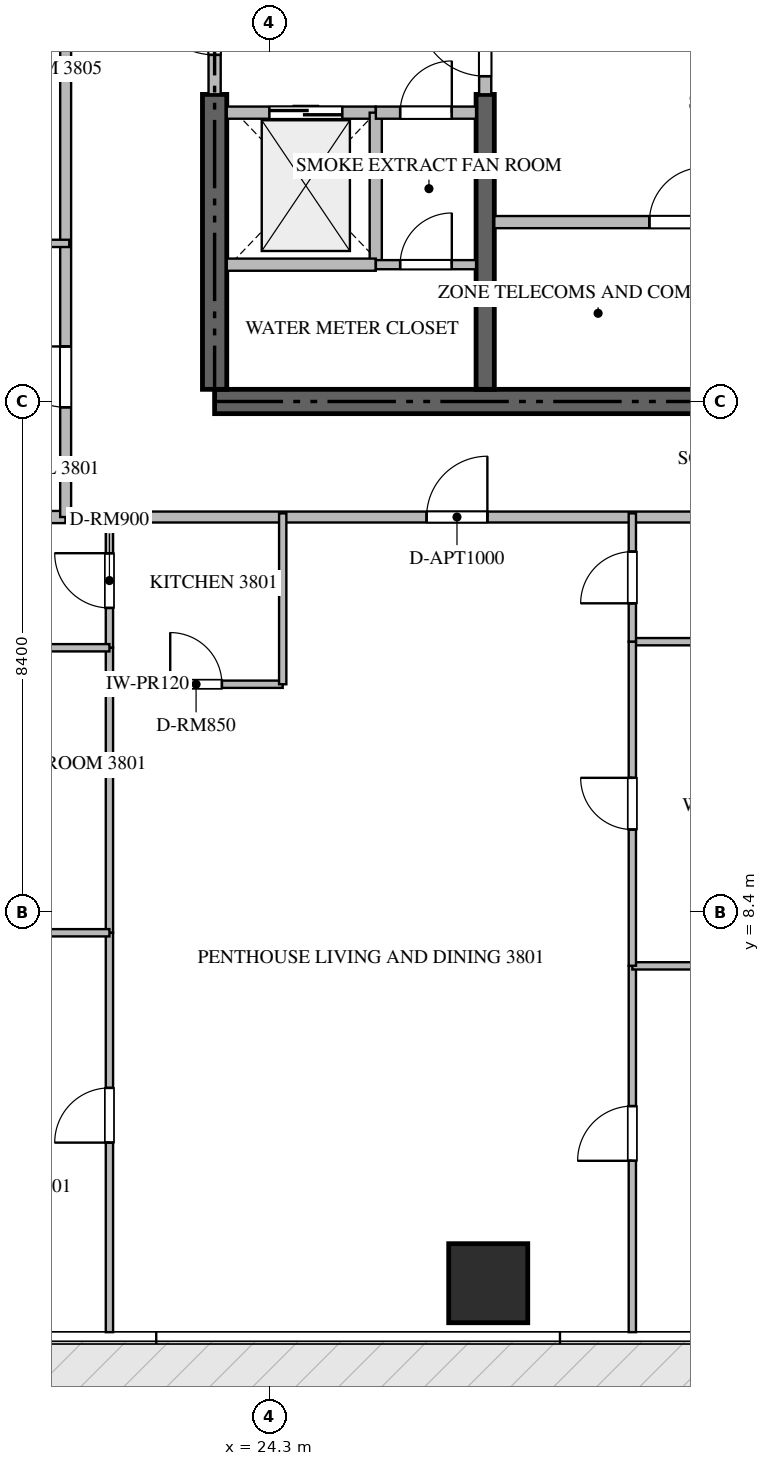
"""IFC4 building model, lengths in metres.
Left out: names, types, materials, properties, quantities, classifications, styles, units other than length and angle.
Written with IfcOpenShell. Run it as: python <this file> out.ifc"""

import sys

from ifc_helpers import new_model, si_unit, direction, frame, frame_2d, origin, origin_2d, place, context, subcontext, project, spatial, rectangle, extrude, source, transform, mapped, element, fill, save


model = new_model("IFC4")
c1 = context("Model", 3, precision=1e-05, world=origin(), true_north=direction((0.0, 1.0)))
c2 = subcontext(c1, "Body", "Model", "MODEL_VIEW")
j1 = project(units=[si_unit("LENGTHUNIT", "METRE"), si_unit("PLANEANGLEUNIT", "RADIAN")], contexts=[c1])
p1 = place(None, origin())
s1 = spatial("IfcSite", under=j1, at=p1, CompositionType="ELEMENT")
p2 = place(p1, origin())
s2 = spatial("IfcBuilding", under=s1, at=p2, CompositionType="ELEMENT")
p3 = place(p2, frame((0.0, 0.0, 153.9)))
s3 = spatial("IfcBuildingStorey", under=s2, at=p3, CompositionType="ELEMENT", Elevation=153.9)
p4 = place(p3, frame((23.4, 16.8, -0.26), z_axis=(0.0, 0.0, 1.0), x_axis=(1.0, 0.0, 0.0)))
e1 = element("IfcWall", 1, at=p4, inside=s3, PredefinedType="SHEAR", context=c2, shape_type="SweptSolid", body=[
    extrude(rectangle(XDim=18.0, YDim=0.4, at=frame_2d((9.0, 0.0))), origin(), (0.0, 0.0, 1.0), 3.748),
])
p5 = place(p3, frame((23.4, 17.0, -0.26), z_axis=(0.0, 0.0, 1.0), x_axis=(0.0, 1.0, 0.0)))
e2 = element("IfcWall", 2, at=p5, inside=s3, PredefinedType="SHEAR", context=c2, shape_type="SweptSolid", body=[
    extrude(rectangle(XDim=4.85, YDim=0.4, at=frame_2d((2.425, 0.0))), origin(), (0.0, 0.0, 1.0), 3.748),
])
p6 = place(p3, frame((27.85, 17.0, -0.26), z_axis=(0.0, 0.0, 1.0), x_axis=(0.0, 1.0, 0.0)))
e3 = element("IfcWall", 3, at=p6, inside=s3, PredefinedType="SHEAR", context=c2, shape_type="SweptSolid", body=[
    extrude(rectangle(XDim=4.85, YDim=0.3, at=frame_2d((2.425, 0.0))), origin(), (0.0, 0.0, 1.0), 3.748),
])
m1 = source(origin(), c2, "Body", "SweptSolid", [
    extrude(rectangle(XDim=1.3, YDim=1.3, at=origin_2d()), origin(), (0.0, 0.0, 1.0), 3.75),
])
p7 = place(p3, frame((27.9, 2.3, -0.26), z_axis=(0.0, 0.0, 1.0), x_axis=(1.0, 0.0, 0.0)))
e4 = element("IfcColumn", 4, at=p7, inside=s3, PredefinedType="COLUMN", context=c2, shape_type="MappedRepresentation", body=[
    mapped(m1, transform((0.0, 0.0, 0.0), scale=1.0)),
])
p8 = place(p3, frame((23.6, 21.55, 0.0), z_axis=(0.0, 0.0, 1.0), x_axis=(1.0, 0.0, 0.0)))
e5 = element("IfcWall", 5, at=p8, inside=s3, PredefinedType="STANDARD", context=c2, shape_type="SweptSolid", body=[
    extrude(rectangle(XDim=2.45, YDim=0.2, at=frame_2d((1.225, 0.0))), origin(), (0.0, 0.0, 1.0), 3.49),
])
p9 = place(p8, frame((0.7, 0.0, 0.0)))
e6 = element("IfcOpeningElement", 6, at=p9, cuts=e5, PredefinedType="OPENING", context=c2, shape_type="SweptSolid", body=[
    extrude(rectangle(XDim=1.2, YDim=2.2, at=frame_2d((0.6, 1.1))), frame((0.0, 0.11, 0.0), z_axis=(0.0, -1.0, 0.0), x_axis=(1.0, 0.0, 0.0)), (0.0, 0.0, 1.0), 0.22),
])
p10 = place(p3, frame((26.05, 19.05, 0.0), z_axis=(0.0, 0.0, 1.0), x_axis=(0.0, 1.0, 0.0)))
e7 = element("IfcWall", 7, at=p10, inside=s3, PredefinedType="STANDARD", context=c2, shape_type="SweptSolid", body=[
    extrude(rectangle(XDim=2.5, YDim=0.2, at=frame_2d((1.25, 0.0))), origin(), (0.0, 0.0, 1.0), 3.49),
])
p11 = place(p3, frame((23.6, 19.05, 0.0), z_axis=(0.0, 0.0, 1.0), x_axis=(1.0, 0.0, 0.0)))
e8 = element("IfcWall", 8, at=p11, inside=s3, PredefinedType="STANDARD", context=c2, shape_type="SweptSolid", body=[
    extrude(rectangle(XDim=2.45, YDim=0.2, at=frame_2d((1.225, 0.0))), origin(), (0.0, 0.0, 1.0), 3.49),
])
p12 = place(p3, frame((26.052, 21.55, 0.0), z_axis=(0.0, 0.0, 1.0), x_axis=(1.0, 0.0, 0.0)))
e9 = element("IfcWall", 9, at=p12, inside=s3, PredefinedType="STANDARD", context=c2, shape_type="SweptSolid", body=[
    extrude(rectangle(XDim=1.648, YDim=0.2, at=frame_2d((0.824, 0.0))), origin(), (0.0, 0.0, 1.0), 3.49),
])
p13 = place(p12, frame((0.399, 0.0, 0.0)))
e10 = element("IfcOpeningElement", 10, at=p13, cuts=e9, PredefinedType="OPENING", context=c2, shape_type="SweptSolid", body=[
    extrude(rectangle(XDim=0.85, YDim=2.1, at=frame_2d((0.425, 1.05))), frame((0.0, 0.11, 0.0), z_axis=(0.0, -1.0, 0.0), x_axis=(1.0, 0.0, 0.0)), (0.0, 0.0, 1.0), 0.22),
])
p14 = place(p3, frame((23.4, 21.852, 0.0), z_axis=(0.0, 0.0, 1.0), x_axis=(0.0, 1.0, 0.0)))
e11 = element("IfcWall", 11, at=p14, inside=s3, PredefinedType="STANDARD", context=c2, shape_type="SweptSolid", body=[
    extrude(rectangle(XDim=2.396, YDim=0.2, at=frame_2d((1.198, 0.0))), origin(), (0.0, 0.0, 1.0), 3.49),
])
p15 = place(p14, frame((0.648, 0.0, 0.0)))
e12 = element("IfcOpeningElement", 12, at=p15, cuts=e11, PredefinedType="OPENING", context=c2, shape_type="SweptSolid", body=[
    extrude(rectangle(XDim=1.1, YDim=2.15, at=frame_2d((0.55, 1.075))), frame((0.0, 0.11, 0.0), z_axis=(0.0, -1.0, 0.0), x_axis=(1.0, 0.0, 0.0)), (0.0, 0.0, 1.0), 0.22),
])
p16 = place(p3, frame((27.85, 21.852, 0.0), z_axis=(0.0, 0.0, 1.0), x_axis=(0.0, 1.0, 0.0)))
e13 = element("IfcWall", 13, at=p16, inside=s3, PredefinedType="STANDARD", context=c2, shape_type="SweptSolid", body=[
    extrude(rectangle(XDim=1.696, YDim=0.2, at=frame_2d((0.848, 0.0))), origin(), (0.0, 0.0, 1.0), 3.49),
])
p17 = place(p16, frame((0.298, 0.0, 0.0)))
e14 = element("IfcOpeningElement", 14, at=p17, cuts=e13, PredefinedType="OPENING", context=c2, shape_type="SweptSolid", body=[
    extrude(rectangle(XDim=1.1, YDim=2.15, at=frame_2d((0.55, 1.075))), frame((0.0, 0.11, 0.0), z_axis=(0.0, -1.0, 0.0), x_axis=(1.0, 0.0, 0.0)), (0.0, 0.0, 1.0), 0.22),
])
p18 = place(p3, frame((26.052, 19.05, 0.0), z_axis=(0.0, 0.0, 1.0), x_axis=(1.0, 0.0, 0.0)))
e15 = element("IfcWall", 15, at=p18, inside=s3, PredefinedType="PARTITIONING", context=c2, shape_type="SweptSolid", body=[
    extrude(rectangle(XDim=1.648, YDim=0.15, at=frame_2d((0.824, 0.0))), origin(), (0.0, 0.0, 1.0), 3.49),
])
p19 = place(p18, frame((0.399, 0.0, 0.0)))
e16 = element("IfcOpeningElement", 16, at=p19, cuts=e15, PredefinedType="OPENING", context=c2, shape_type="SweptSolid", body=[
    extrude(rectangle(XDim=0.85, YDim=2.1, at=frame_2d((0.425, 1.05))), frame((0.0, 0.085, 0.0), z_axis=(0.0, -1.0, 0.0), x_axis=(1.0, 0.0, 0.0)), (0.0, 0.0, 1.0), 0.17),
])
p20 = place(p3, frame((28.0, 19.75, 0.0), z_axis=(0.0, 0.0, 1.0), x_axis=(1.0, 0.0, 0.0)))
e17 = element("IfcWall", 17, at=p20, inside=s3, PredefinedType="STANDARD", context=c2, shape_type="SweptSolid", body=[
    extrude(rectangle(XDim=6.0, YDim=0.2, at=frame_2d((3.0, 0.0))), origin(), (0.0, 0.0, 1.0), 3.49),
])
p21 = place(p20, frame((2.55, 0.0, 0.0)))
e18 = element("IfcOpeningElement", 18, at=p21, cuts=e17, PredefinedType="OPENING", context=c2, shape_type="SweptSolid", body=[
    extrude(rectangle(XDim=0.9, YDim=2.1, at=frame_2d((0.45, 1.05))), frame((0.0, 0.11, 0.0), z_axis=(0.0, -1.0, 0.0), x_axis=(1.0, 0.0, 0.0)), (0.0, 0.0, 1.0), 0.22),
])
p22 = place(p3, frame((7.882, 14.9, 0.0), z_axis=(0.0, 0.0, 1.0), x_axis=(1.0, 0.0, 0.0)))
e19 = element("IfcWall", 19, at=p22, inside=s3, PredefinedType="PARTITIONING", context=c2, shape_type="SweptSolid", body=[
    extrude(rectangle(XDim=13.068, YDim=0.2, at=frame_2d((6.534, 0.0))), origin(), (0.0, 0.0, 1.0), 3.49),
])
p23 = place(p3, frame((20.952, 14.9, 0.0), z_axis=(0.0, 0.0, 1.0), x_axis=(1.0, 0.0, 0.0)))
e20 = element("IfcWall", 20, at=p23, inside=s3, PredefinedType="PARTITIONING", context=c2, shape_type="SweptSolid", body=[
    extrude(rectangle(XDim=22.896, YDim=0.18, at=frame_2d((11.448, 0.0))), origin(), (0.0, 0.0, 1.0), 3.49),
])
p24 = place(p23, frame((5.934, 0.0, 0.0)))
e21 = element("IfcOpeningElement", 21, at=p24, cuts=e20, PredefinedType="OPENING", context=c2, shape_type="SweptSolid", body=[
    extrude(rectangle(XDim=1.0, YDim=2.15, at=frame_2d((0.5, 1.075))), frame((0.0, 0.1, 0.0), z_axis=(0.0, -1.0, 0.0), x_axis=(1.0, 0.0, 0.0)), (0.0, 0.0, 1.0), 0.2),
])
p25 = place(p23, frame((16.51, 0.0, 0.0)))
e22 = element("IfcOpeningElement", 22, at=p25, cuts=e20, PredefinedType="OPENING", context=c2, shape_type="SweptSolid", body=[
    extrude(rectangle(XDim=1.0, YDim=2.15, at=frame_2d((0.5, 1.075))), frame((0.0, 0.1, 0.0), z_axis=(0.0, -1.0, 0.0), x_axis=(1.0, 0.0, 0.0)), (0.0, 0.0, 1.0), 0.2),
])
p26 = place(p3, frame((20.95, 14.9, 0.0), z_axis=(0.0, 0.0, 1.0), x_axis=(0.0, 1.0, 0.0)))
e23 = element("IfcWall", 23, at=p26, inside=s3, PredefinedType="PARTITIONING", context=c2, shape_type="SweptSolid", body=[
    extrude(rectangle(XDim=18.7, YDim=0.18, at=frame_2d((9.35, 0.0))), origin(), (0.0, 0.0, 1.0), 3.49),
])
p27 = place(p26, frame((1.805, 0.0, 0.0)))
e24 = element("IfcOpeningElement", 24, at=p27, cuts=e23, PredefinedType="OPENING", context=c2, shape_type="SweptSolid", body=[
    extrude(rectangle(XDim=1.0, YDim=2.15, at=frame_2d((0.5, 1.075))), frame((0.0, 0.1, 0.0), z_axis=(0.0, -1.0, 0.0), x_axis=(1.0, 0.0, 0.0)), (0.0, 0.0, 1.0), 0.2),
])
p28 = place(p26, frame((15.027, 0.0, 0.0)))
e25 = element("IfcOpeningElement", 25, at=p28, cuts=e23, PredefinedType="OPENING", context=c2, shape_type="SweptSolid", body=[
    extrude(rectangle(XDim=1.0, YDim=2.15, at=frame_2d((0.5, 1.075))), frame((0.0, 0.1, 0.0), z_axis=(0.0, -1.0, 0.0), x_axis=(1.0, 0.0, 0.0)), (0.0, 0.0, 1.0), 0.2),
])
p29 = place(p3, frame((21.67, 12.15, 0.0), z_axis=(0.0, 0.0, 1.0), x_axis=(1.0, 0.0, 0.0)))
e26 = element("IfcWall", 26, at=p29, inside=s3, PredefinedType="PARTITIONING", context=c2, shape_type="SweptSolid", body=[
    extrude(rectangle(XDim=2.85, YDim=0.12, at=frame_2d((1.425, 0.0))), origin(), (0.0, 0.0, 1.0), 3.49),
])
p30 = place(p29, frame((1.0, 0.0, 0.0)))
e27 = element("IfcOpeningElement", 27, at=p30, cuts=e26, PredefinedType="OPENING", context=c2, shape_type="SweptSolid", body=[
    extrude(rectangle(XDim=0.85, YDim=2.1, at=frame_2d((0.425, 1.05))), frame((0.0, 0.07, 0.0), z_axis=(0.0, -1.0, 0.0), x_axis=(1.0, 0.0, 0.0)), (0.0, 0.0, 1.0), 0.14),
])
p31 = place(p3, frame((24.52, 12.15, 0.0), z_axis=(0.0, 0.0, 1.0), x_axis=(0.0, 1.0, 0.0)))
e28 = element("IfcWall", 28, at=p31, inside=s3, PredefinedType="PARTITIONING", context=c2, shape_type="SweptSolid", body=[
    extrude(rectangle(XDim=2.81, YDim=0.12, at=frame_2d((1.405, 0.0))), origin(), (0.0, 0.0, 1.0), 3.49),
])
p32 = place(p3, frame((21.67, 12.75, 0.0), z_axis=(0.0, 0.0, 1.0), x_axis=(0.0, 1.0, 0.0)))
e29 = element("IfcWall", 29, at=p32, inside=s3, PredefinedType="PARTITIONING", context=c2, shape_type="SweptSolid", body=[
    extrude(rectangle(XDim=2.21, YDim=0.12, at=frame_2d((1.105, 0.0))), origin(), (0.0, 0.0, 1.0), 3.49),
])
p33 = place(p32, frame((0.655, 0.0, 0.0)))
e30 = element("IfcOpeningElement", 30, at=p33, cuts=e29, PredefinedType="OPENING", context=c2, shape_type="SweptSolid", body=[
    extrude(rectangle(XDim=0.9, YDim=2.1, at=frame_2d((0.45, 1.05))), frame((0.0, 0.07, 0.0), z_axis=(0.0, -1.0, 0.0), x_axis=(1.0, 0.0, 0.0)), (0.0, 0.0, 1.0), 0.14),
])
p34 = place(p3, frame((21.67, 1.495, 0.0), z_axis=(0.0, 0.0, 1.0), x_axis=(0.0, 1.0, 0.0)))
e31 = element("IfcWall", 31, at=p34, inside=s3, PredefinedType="PARTITIONING", context=c2, shape_type="SweptSolid", body=[
    extrude(rectangle(XDim=6.568, YDim=0.12, at=frame_2d((3.284, 0.0))), origin(), (0.0, 0.0, 1.0), 3.49),
])
p35 = place(p34, frame((3.117, 0.0, 0.0)))
e32 = element("IfcOpeningElement", 32, at=p35, cuts=e31, PredefinedType="OPENING", context=c2, shape_type="SweptSolid", body=[
    extrude(rectangle(XDim=0.9, YDim=2.1, at=frame_2d((0.45, 1.05))), frame((0.0, 0.07, 0.0), z_axis=(0.0, -1.0, 0.0), x_axis=(1.0, 0.0, 0.0)), (0.0, 0.0, 1.0), 0.14),
])
p36 = place(p3, frame((21.67, 8.065, 0.0), z_axis=(0.0, 0.0, 1.0), x_axis=(0.0, 1.0, 0.0)))
e33 = element("IfcWall", 33, at=p36, inside=s3, PredefinedType="PARTITIONING", context=c2, shape_type="SweptSolid", body=[
    extrude(rectangle(XDim=4.683, YDim=0.12, at=frame_2d((2.342, 0.0))), origin(), (0.0, 0.0, 1.0), 3.49),
])
p37 = place(p3, frame((16.52, 8.063, 0.0), z_axis=(0.0, 0.0, 1.0), x_axis=(1.0, 0.0, 0.0)))
e34 = element("IfcWall", 34, at=p37, inside=s3, PredefinedType="PARTITIONING", context=c2, shape_type="SweptSolid", body=[
    extrude(rectangle(XDim=5.15, YDim=0.12, at=frame_2d((2.575, 0.0))), origin(), (0.0, 0.0, 1.0), 3.49),
])
p38 = place(p3, frame((18.622, 12.75, 0.0), z_axis=(0.0, 0.0, 1.0), x_axis=(1.0, 0.0, 0.0)))
e35 = element("IfcWall", 35, at=p38, inside=s3, PredefinedType="PARTITIONING", context=c2, shape_type="SweptSolid", body=[
    extrude(rectangle(XDim=3.048, YDim=0.12, at=frame_2d((1.524, 0.0))), origin(), (0.0, 0.0, 1.0), 3.49),
])
p39 = place(p38, frame((1.099, 0.0, 0.0)))
e36 = element("IfcOpeningElement", 36, at=p39, cuts=e35, PredefinedType="OPENING", context=c2, shape_type="SweptSolid", body=[
    extrude(rectangle(XDim=0.85, YDim=2.1, at=frame_2d((0.425, 1.05))), frame((0.0, 0.07, 0.0), z_axis=(0.0, -1.0, 0.0), x_axis=(1.0, 0.0, 0.0)), (0.0, 0.0, 1.0), 0.14),
])
p40 = place(p3, frame((30.27, 1.495, 0.0), z_axis=(0.0, 0.0, 1.0), x_axis=(0.0, 1.0, 0.0)))
e37 = element("IfcWall", 37, at=p40, inside=s3, PredefinedType="PARTITIONING", context=c2, shape_type="SweptSolid", body=[
    extrude(rectangle(XDim=6.024, YDim=0.12, at=frame_2d((3.012, 0.0))), origin(), (0.0, 0.0, 1.0), 3.49),
])
p41 = place(p40, frame((2.818, 0.0, 0.0)))
e38 = element("IfcOpeningElement", 38, at=p41, cuts=e37, PredefinedType="OPENING", context=c2, shape_type="SweptSolid", body=[
    extrude(rectangle(XDim=0.9, YDim=2.1, at=frame_2d((0.45, 1.05))), frame((0.0, 0.07, 0.0), z_axis=(0.0, -1.0, 0.0), x_axis=(1.0, 0.0, 0.0)), (0.0, 0.0, 1.0), 0.14),
])
for number, where, z_axis, x_axis in (
    (39, (30.27, 7.519, 0.0), (0.0, 0.0, 1.0), (1.0, 0.0, 0.0)),
    (40, (30.27, 12.85, 0.0), (0.0, 0.0, 1.0), (1.0, 0.0, 0.0)),
):
    element("IfcWall", number, at=place(p3, frame(where, z_axis=z_axis, x_axis=x_axis)), inside=s3, PredefinedType="PARTITIONING", context=c2, shape_type="SweptSolid", body=[
        extrude(rectangle(XDim=5.09, YDim=0.12, at=frame_2d((2.545, 0.0))), origin(), (0.0, 0.0, 1.0), 3.49),
    ])
p42 = place(p3, frame((30.27, 7.521, 0.0), z_axis=(0.0, 0.0, 1.0), x_axis=(0.0, 1.0, 0.0)))
e41 = element("IfcWall", 41, at=p42, inside=s3, PredefinedType="PARTITIONING", context=c2, shape_type="SweptSolid", body=[
    extrude(rectangle(XDim=5.329, YDim=0.12, at=frame_2d((2.665, 0.0))), origin(), (0.0, 0.0, 1.0), 3.49),
])
p43 = place(p42, frame((2.24, 0.0, 0.0)))
e42 = element("IfcOpeningElement", 42, at=p43, cuts=e41, PredefinedType="OPENING", context=c2, shape_type="SweptSolid", body=[
    extrude(rectangle(XDim=0.85, YDim=2.1, at=frame_2d((0.425, 1.05))), frame((0.0, 0.07, 0.0), z_axis=(0.0, -1.0, 0.0), x_axis=(1.0, 0.0, 0.0)), (0.0, 0.0, 1.0), 0.14),
])
p44 = place(p3, frame((30.27, 12.852, 0.0), z_axis=(0.0, 0.0, 1.0), x_axis=(0.0, 1.0, 0.0)))
e43 = element("IfcWall", 43, at=p44, inside=s3, PredefinedType="PARTITIONING", context=c2, shape_type="SweptSolid", body=[
    extrude(rectangle(XDim=2.108, YDim=0.12, at=frame_2d((1.054, 0.0))), origin(), (0.0, 0.0, 1.0), 3.49),
])
p45 = place(p44, frame((0.629, 0.0, 0.0)))
e44 = element("IfcOpeningElement", 44, at=p45, cuts=e43, PredefinedType="OPENING", context=c2, shape_type="SweptSolid", body=[
    extrude(rectangle(XDim=0.85, YDim=2.1, at=frame_2d((0.425, 1.05))), frame((0.0, 0.07, 0.0), z_axis=(0.0, -1.0, 0.0), x_axis=(1.0, 0.0, 0.0)), (0.0, 0.0, 1.0), 0.14),
])
p46 = place(p3, frame((18.902, 19.4, 0.0), z_axis=(0.0, 0.0, 1.0), x_axis=(1.0, 0.0, 0.0)))
e45 = element("IfcWall", 45, at=p46, inside=s3, PredefinedType="PARTITIONING", context=c2, shape_type="SweptSolid", body=[
    extrude(rectangle(XDim=2.108, YDim=0.12, at=frame_2d((1.054, 0.0))), origin(), (0.0, 0.0, 1.0), 3.49),
])
p47 = place(p46, frame((0.629, 0.0, 0.0)))
e46 = element("IfcOpeningElement", 46, at=p47, cuts=e45, PredefinedType="OPENING", context=c2, shape_type="SweptSolid", body=[
    extrude(rectangle(XDim=0.85, YDim=2.1, at=frame_2d((0.425, 1.05))), frame((0.0, 0.07, 0.0), z_axis=(0.0, -1.0, 0.0), x_axis=(1.0, 0.0, 0.0)), (0.0, 0.0, 1.0), 0.14),
])
m2 = source(origin(), c2, "Body", "SweptSolid", [
    extrude(rectangle(XDim=1.2, YDim=2.2, at=frame_2d((0.6, 1.1))), frame((0.0, 0.025, 0.0), z_axis=(0.0, -1.0, 0.0), x_axis=(1.0, 0.0, 0.0)), (0.0, 0.0, 1.0), 0.05),
])
p48 = place(p9, origin())
e47 = element("IfcDoor", 47, at=p48, inside=s3, OperationType="DOUBLE_DOOR_SLIDING", PredefinedType="DOOR", context=c2, shape_type="MappedRepresentation", body=[
    mapped(m2, transform((0.0, 0.0, 0.0), scale=1.0)),
])
fill(e6, e47)
m3 = source(origin(), c2, "Body", "SweptSolid", [
    extrude(rectangle(XDim=0.85, YDim=2.1, at=frame_2d((0.425, 1.05))), frame((0.0, 0.025, 0.0), z_axis=(0.0, -1.0, 0.0), x_axis=(1.0, 0.0, 0.0)), (0.0, 0.0, 1.0), 0.05),
])
p49 = place(p13, origin())
e48 = element("IfcDoor", 48, at=p49, inside=s3, OperationType="SINGLE_SWING_RIGHT", PredefinedType="DOOR", context=c2, shape_type="MappedRepresentation", body=[
    mapped(m3, transform((0.0, 0.0, 0.0), scale=1.0)),
])
fill(e10, e48)
m4 = source(origin(), c2, "Body", "SweptSolid", [
    extrude(rectangle(XDim=1.1, YDim=2.15, at=frame_2d((0.55, 1.075))), frame((0.0, 0.025, 0.0), z_axis=(0.0, -1.0, 0.0), x_axis=(1.0, 0.0, 0.0)), (0.0, 0.0, 1.0), 0.05),
])
p50 = place(p15, origin())
e49 = element("IfcDoor", 49, at=p50, inside=s3, OperationType="SINGLE_SWING_RIGHT", PredefinedType="DOOR", context=c2, shape_type="MappedRepresentation", body=[
    mapped(m4, transform((0.0, 0.0, 0.0), scale=1.0)),
])
fill(e12, e49)
p51 = place(p17, origin())
e50 = element("IfcDoor", 50, at=p51, inside=s3, OperationType="SINGLE_SWING_RIGHT", PredefinedType="DOOR", context=c2, shape_type="MappedRepresentation", body=[
    mapped(m4, transform((0.0, 0.0, 0.0), scale=1.0)),
])
fill(e14, e50)
p52 = place(p19, origin())
e51 = element("IfcDoor", 51, at=p52, inside=s3, OperationType="SINGLE_SWING_RIGHT", PredefinedType="DOOR", context=c2, shape_type="MappedRepresentation", body=[
    mapped(m3, transform((0.0, 0.0, 0.0), scale=1.0)),
])
fill(e16, e51)
m5 = source(origin(), c2, "Body", "SweptSolid", [
    extrude(rectangle(XDim=0.9, YDim=2.1, at=frame_2d((0.45, 1.05))), frame((0.0, 0.025, 0.0), z_axis=(0.0, -1.0, 0.0), x_axis=(1.0, 0.0, 0.0)), (0.0, 0.0, 1.0), 0.05),
])
p53 = place(p21, origin())
e52 = element("IfcDoor", 52, at=p53, inside=s3, OperationType="SINGLE_SWING_RIGHT", PredefinedType="DOOR", context=c2, shape_type="MappedRepresentation", body=[
    mapped(m5, transform((0.0, 0.0, 0.0), scale=1.0)),
])
fill(e18, e52)
m6 = source(origin(), c2, "Body", "SweptSolid", [
    extrude(rectangle(XDim=1.0, YDim=2.15, at=frame_2d((0.5, 1.075))), frame((0.0, 0.025, 0.0), z_axis=(0.0, -1.0, 0.0), x_axis=(1.0, 0.0, 0.0)), (0.0, 0.0, 1.0), 0.05),
])
p54 = place(p24, origin())
e53 = element("IfcDoor", 53, at=p54, inside=s3, OperationType="SINGLE_SWING_RIGHT", PredefinedType="DOOR", context=c2, shape_type="MappedRepresentation", body=[
    mapped(m6, transform((0.0, 0.0, 0.0), scale=1.0)),
])
fill(e21, e53)
p55 = place(p27, origin())
e54 = element("IfcDoor", 54, at=p55, inside=s3, OperationType="SINGLE_SWING_RIGHT", PredefinedType="DOOR", context=c2, shape_type="MappedRepresentation", body=[
    mapped(m6, transform((0.0, 0.0, 0.0), scale=1.0)),
])
fill(e24, e54)
p56 = place(p30, origin())
e55 = element("IfcDoor", 55, at=p56, inside=s3, OperationType="SINGLE_SWING_LEFT", PredefinedType="DOOR", context=c2, shape_type="MappedRepresentation", body=[
    mapped(m3, transform((0.0, 0.0, 0.0), scale=1.0)),
])
fill(e27, e55)
p57 = place(p33, origin())
e56 = element("IfcDoor", 56, at=p57, inside=s3, OperationType="SINGLE_SWING_RIGHT", PredefinedType="DOOR", context=c2, shape_type="MappedRepresentation", body=[
    mapped(m5, transform((0.0, 0.0, 0.0), scale=1.0)),
])
fill(e30, e56)
p58 = place(p35, origin())
e57 = element("IfcDoor", 57, at=p58, inside=s3, OperationType="SINGLE_SWING_LEFT", PredefinedType="DOOR", context=c2, shape_type="MappedRepresentation", body=[
    mapped(m5, transform((0.0, 0.0, 0.0), scale=1.0)),
])
fill(e32, e57)
p59 = place(p41, origin())
e58 = element("IfcDoor", 58, at=p59, inside=s3, OperationType="SINGLE_SWING_LEFT", PredefinedType="DOOR", context=c2, shape_type="MappedRepresentation", body=[
    mapped(m5, transform((0.0, 0.0, 0.0), scale=1.0)),
])
fill(e38, e58)
p60 = place(p43, origin())
e59 = element("IfcDoor", 59, at=p60, inside=s3, OperationType="SINGLE_SWING_RIGHT", PredefinedType="DOOR", context=c2, shape_type="MappedRepresentation", body=[
    mapped(m3, transform((0.0, 0.0, 0.0), scale=1.0)),
])
fill(e42, e59)
p61 = place(p45, origin())
e60 = element("IfcDoor", 60, at=p61, inside=s3, OperationType="SINGLE_SWING_LEFT", PredefinedType="DOOR", context=c2, shape_type="MappedRepresentation", body=[
    mapped(m3, transform((0.0, 0.0, 0.0), scale=1.0)),
])
fill(e44, e60)
save(model, sys.argv[1])
